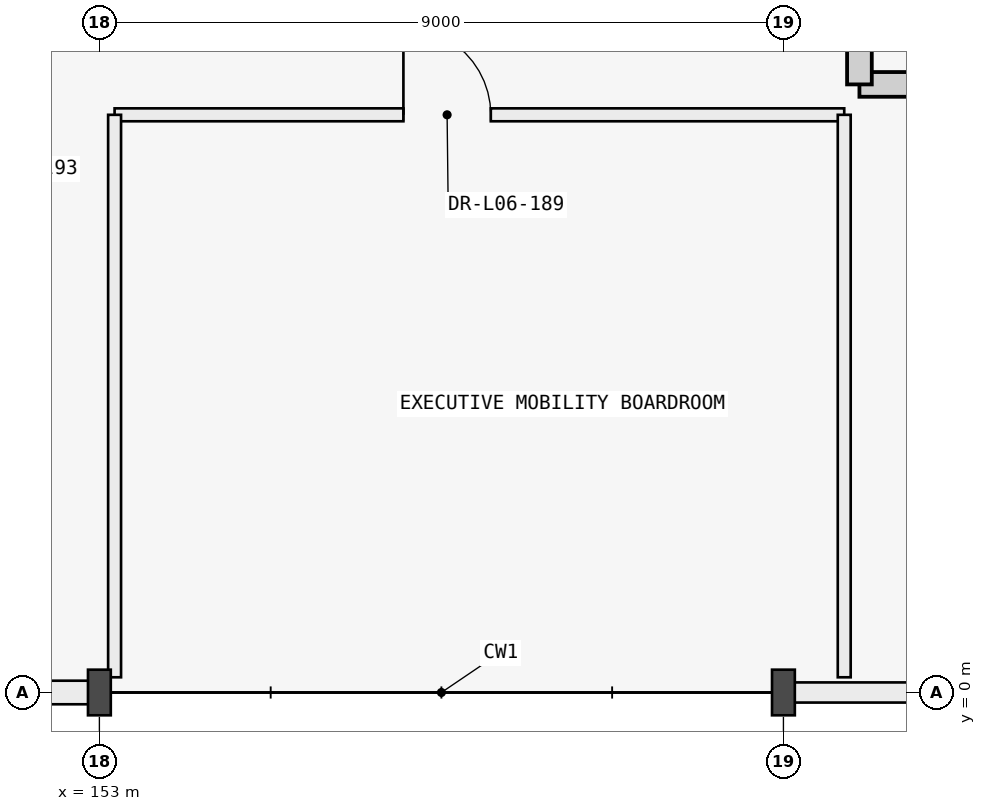
"""IFC4 building model, lengths in metres.
Left out: names, types, materials, properties, quantities, classifications, styles, units other than length and angle.
Written with IfcOpenShell. Run it as: python <this file> out.ifc"""

import sys

from ifc_helpers import new_model, si_unit, direction, frame, frame_2d, origin, origin_2d, place, context, subcontext, project, spatial, rectangle, i_section, extrude, element, fill, save


model = new_model("IFC4")
c1 = context("Model", 3, precision=1e-05, world=origin(), true_north=direction((0.0, 1.0)))
c2 = subcontext(c1, "Body", "Model", "MODEL_VIEW")
j1 = project(units=[si_unit("LENGTHUNIT", "METRE"), si_unit("PLANEANGLEUNIT", "RADIAN")], contexts=[c1])
p1 = place(None, origin())
s1 = spatial("IfcSite", under=j1, at=p1, CompositionType="ELEMENT")
p2 = place(p1, origin())
s2 = spatial("IfcBuilding", under=s1, at=p2, CompositionType="ELEMENT")
p3 = place(p2, frame((0.0, 0.0, 25.2)))
s3 = spatial("IfcBuildingStorey", under=s2, at=p3, CompositionType="ELEMENT", Elevation=25.2)
for number, where, z_axis, x_axis in (
    (1, (153.0, 0.0, 0.0), (0.0, 0.0, 1.0), (1.0, 0.0, 0.0)),
    (2, (162.0, 0.0, 0.0), (0.0, 0.0, 1.0), (1.0, 0.0, 0.0)),
):
    element("IfcColumn", number, at=place(p3, frame(where, z_axis=z_axis, x_axis=x_axis)), inside=s3, PredefinedType="COLUMN", context=c2, shape_type="SweptSolid", body=[
        extrude(i_section(OverallWidth=0.3, OverallDepth=0.6, WebThickness=0.015, FlangeThickness=0.03, FilletRadius=0.027, at=origin_2d()), origin(), (0.0, 0.0, 1.0), 4.2),
    ])
p4 = place(p3, frame((144.009, 0.0, 0.0), z_axis=(0.0, 0.0, 1.0), x_axis=(1.0, 0.0, 0.0)))
e3 = element("IfcWall", 3, at=p4, inside=s3, PredefinedType="STANDARD", context=c2, shape_type="SweptSolid", body=[
    extrude(rectangle(XDim=8.983, YDim=0.31, at=frame_2d((4.492, 0.0))), origin(), (0.0, 0.0, 1.0), 3.635),
])
p5 = place(p4, frame((2.892, 0.0, 0.95)))
e4 = element("IfcOpeningElement", 4, at=p5, cuts=e3, PredefinedType="OPENING", context=c2, shape_type="SweptSolid", body=[
    extrude(rectangle(XDim=3.2, YDim=1.45, at=frame_2d((1.6, 0.725))), frame((0.0, 0.165, 0.0), z_axis=(0.0, -1.0, 0.0), x_axis=(1.0, 0.0, 0.0)), (0.0, 0.0, 1.0), 0.33),
])
p6 = place(p3, frame((162.008, 0.0, 0.0), z_axis=(0.0, 0.0, 1.0), x_axis=(1.0, 0.0, 0.0)))
e5 = element("IfcWall", 5, at=p6, inside=s3, PredefinedType="STANDARD", context=c2, shape_type="SweptSolid", body=[
    extrude(rectangle(XDim=8.984, YDim=0.265, at=frame_2d((4.492, 0.0))), origin(), (0.0, 0.0, 1.0), 3.635),
])
p7 = place(p6, frame((2.692, 0.0, 0.95)))
e6 = element("IfcOpeningElement", 6, at=p7, cuts=e5, PredefinedType="OPENING", context=c2, shape_type="SweptSolid", body=[
    extrude(rectangle(XDim=3.6, YDim=1.65, at=frame_2d((1.8, 0.825))), frame((0.0, 0.143, 0.0), z_axis=(0.0, -1.0, 0.0), x_axis=(1.0, 0.0, 0.0)), (0.0, 0.0, 1.0), 0.285),
])
p8 = place(p3, frame((163.0, 8.0, 0.0), z_axis=(0.0, 0.0, 1.0), x_axis=(1.0, 0.0, 0.0)))
e7 = element("IfcWall", 7, at=p8, inside=s3, PredefinedType="SHEAR", context=c2, shape_type="SweptSolid", body=[
    extrude(rectangle(XDim=10.8, YDim=0.325, at=frame_2d((5.4, 0.0))), origin(), (0.0, 0.0, 1.0), 3.96),
])
p9 = place(p3, frame((163.0, 17.5, 0.0), z_axis=(0.0, 0.0, 1.0), x_axis=(0.0, -1.0, 0.0)))
e8 = element("IfcWall", 8, at=p9, inside=s3, PredefinedType="SHEAR", context=c2, shape_type="SweptSolid", body=[
    extrude(rectangle(XDim=9.5, YDim=0.325, at=frame_2d((4.75, 0.0))), origin(), (0.0, 0.0, 1.0), 3.96),
])
p10 = place(p3, frame((153.2, 7.6, 0.0), z_axis=(0.0, 0.0, 1.0), x_axis=(1.0, 0.0, 0.0)))
e9 = element("IfcWall", 9, at=p10, inside=s3, PredefinedType="PARTITIONING", context=c2, shape_type="SweptSolid", body=[
    extrude(rectangle(XDim=9.6, YDim=0.17, at=frame_2d((4.8, 0.0))), origin(), (0.0, 0.0, 1.0), 3.96),
])
p11 = place(p10, frame((3.8, 0.0, 0.0)))
e10 = element("IfcOpeningElement", 10, at=p11, cuts=e9, PredefinedType="OPENING", context=c2, shape_type="SweptSolid", body=[
    extrude(rectangle(XDim=1.15, YDim=2.15, at=frame_2d((0.575, 1.075))), frame((0.0, 0.095, 0.0), z_axis=(0.0, -1.0, 0.0), x_axis=(1.0, 0.0, 0.0)), (0.0, 0.0, 1.0), 0.19),
])
p12 = place(p3, frame((153.2, 0.2, 0.0), z_axis=(0.0, 0.0, 1.0), x_axis=(0.0, 1.0, 0.0)))
e11 = element("IfcWall", 11, at=p12, inside=s3, PredefinedType="PARTITIONING", context=c2, shape_type="SweptSolid", body=[
    extrude(rectangle(XDim=7.4, YDim=0.17, at=frame_2d((3.7, 0.0))), origin(), (0.0, 0.0, 1.0), 3.635),
])
p13 = place(p3, frame((162.8, 0.2, 0.0), z_axis=(0.0, 0.0, 1.0), x_axis=(0.0, 1.0, 0.0)))
e12 = element("IfcWall", 12, at=p13, inside=s3, PredefinedType="PARTITIONING", context=c2, shape_type="SweptSolid", body=[
    extrude(rectangle(XDim=7.4, YDim=0.17, at=frame_2d((3.7, 0.0))), origin(), (0.0, 0.0, 1.0), 3.96),
])
p14 = place(p11, origin())
e13 = element("IfcDoor", 13, at=p14, inside=s3, OperationType="SINGLE_SWING_LEFT", PredefinedType="DOOR", context=c2, shape_type="SweptSolid", body=[
    extrude(rectangle(XDim=1.15, YDim=2.15, at=frame_2d((0.575, 1.075))), frame((0.0, 0.025, 0.0), z_axis=(0.0, -1.0, 0.0), x_axis=(1.0, 0.0, 0.0)), (0.0, 0.0, 1.0), 0.05),
])
fill(e10, e13)
save(model, sys.argv[1])
